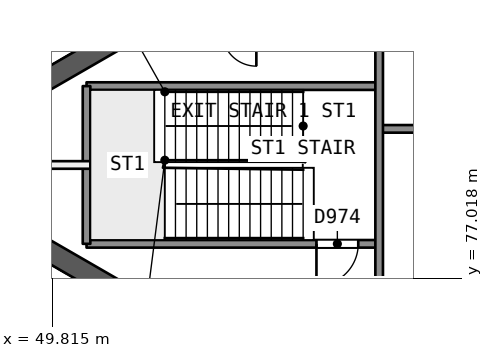
"""IFC4 building model, lengths in metres.
Left out: names, types, materials, properties, quantities, classifications, styles, units other than length and angle.
Written with IfcOpenShell. Run it as: python <this file> out.ifc"""

import sys

from ifc_helpers import new_model, si_unit, direction, frame, frame_2d, origin, place, context, subcontext, project, spatial, rectangle, extrude, element, fill, save


model = new_model("IFC4")
c1 = context("Model", 3, precision=1e-05, world=origin(), true_north=direction((0.0, 1.0)))
c2 = subcontext(c1, "Body", "Model", "MODEL_VIEW")
j1 = project(units=[si_unit("LENGTHUNIT", "METRE"), si_unit("PLANEANGLEUNIT", "RADIAN")], contexts=[c1])
p1 = place(None, origin())
s1 = spatial("IfcSite", under=j1, at=p1, CompositionType="ELEMENT")
p2 = place(p1, origin())
s2 = spatial("IfcBuilding", under=s1, at=p2, CompositionType="ELEMENT")
p3 = place(p2, frame((0.0, 0.0, 185.9)))
s3 = spatial("IfcBuildingStorey", under=s2, at=p3, CompositionType="ELEMENT", Elevation=185.9)
p4 = place(p3, frame((60.709, 88.614, 0.0), z_axis=(0.0, 0.0, 1.0), x_axis=(-0.866020164116, -0.500009075263, 0.0)))
e1 = element("IfcWall", 1, at=p4, inside=s3, PredefinedType="SHEAR", context=c2, shape_type="SweptSolid", body=[
    extrude(rectangle(XDim=14.058, YDim=0.55, at=frame_2d((7.029, 0.0))), origin(), (0.0, 0.0, 1.0), 3.7),
])
p5 = place(p3, frame((48.672, 78.336, 0.0), z_axis=(0.0, 0.0, 1.0), x_axis=(0.866023530946, -0.500003243837, 0.0)))
e2 = element("IfcWall", 2, at=p5, inside=s3, PredefinedType="SHEAR", context=c2, shape_type="SweptSolid", body=[
    extrude(rectangle(XDim=14.175, YDim=0.55, at=frame_2d((7.087, 0.0))), origin(), (0.0, 0.0, 1.0), 3.7),
])
p6 = place(p3, frame((42.971, 82.7, 0.0), z_axis=(0.0, 0.0, 1.0), x_axis=(0.866024890781, 0.500000888547, 0.0)))
e3 = element("IfcWall", 3, at=p6, inside=s3, PredefinedType="SOLIDWALL", context=c2, shape_type="SweptSolid", body=[
    extrude(rectangle(XDim=52.776, YDim=0.3, at=frame_2d((26.388, 0.0))), origin(), (0.0, 0.0, 1.0), 3.25),
])
p7 = place(p6, frame((20.511, 0.0, 0.0)))
e4 = element("IfcOpeningElement", 4, at=p7, cuts=e3, PredefinedType="OPENING", context=c2, shape_type="SweptSolid", body=[
    extrude(rectangle(XDim=2.4, YDim=2.4, at=frame_2d((1.2, 1.2))), frame((0.0, 0.161, 0.0), z_axis=(0.0, -1.0, 0.0), x_axis=(1.0, 0.0, 0.0)), (0.0, 0.0, 1.0), 0.321),
])
p8 = place(p6, frame((9.385, 0.0, 0.0)))
e5 = element("IfcOpeningElement", 5, at=p8, cuts=e3, PredefinedType="OPENING", context=c2, shape_type="SweptSolid", body=[
    extrude(rectangle(XDim=2.4, YDim=2.4, at=frame_2d((1.2, 1.2))), frame((0.0, 0.161, 0.0), z_axis=(0.0, -1.0, 0.0), x_axis=(1.0, 0.0, 0.0)), (0.0, 0.0, 1.0), 0.321),
])
p9 = place(p6, frame((39.984, 0.0, 0.0)))
e6 = element("IfcOpeningElement", 6, at=p9, cuts=e3, PredefinedType="OPENING", context=c2, shape_type="SweptSolid", body=[
    extrude(rectangle(XDim=2.4, YDim=2.4, at=frame_2d((1.2, 1.2))), frame((0.0, 0.161, 0.0), z_axis=(0.0, -1.0, 0.0), x_axis=(1.0, 0.0, 0.0)), (0.0, 0.0, 1.0), 0.321),
])
p10 = place(p6, frame((26.268, 0.0, 0.9)))
e7 = element("IfcOpeningElement", 7, at=p10, cuts=e3, PredefinedType="OPENING", context=c2, shape_type="SweptSolid", body=[
    extrude(rectangle(XDim=1.8, YDim=1.5, at=frame_2d((0.9, 0.75))), frame((0.0, 0.161, 0.0), z_axis=(0.0, -1.0, 0.0), x_axis=(1.0, 0.0, 0.0)), (0.0, 0.0, 1.0), 0.321),
])
p11 = place(p3, frame((88.677, 50.912, 0.0), z_axis=(0.0, 0.0, 1.0), x_axis=(-0.866024890781, 0.500000888547, 0.0)))
e8 = element("IfcWall", 8, at=p11, inside=s3, PredefinedType="SOLIDWALL", context=c2, shape_type="SweptSolid", body=[
    extrude(rectangle(XDim=52.776, YDim=0.3, at=frame_2d((26.388, 0.0))), origin(), (0.0, 0.0, 1.0), 3.25),
])
p12 = place(p11, frame((18.953, 0.0, 0.0)))
e9 = element("IfcOpeningElement", 9, at=p12, cuts=e8, PredefinedType="OPENING", context=c2, shape_type="SweptSolid", body=[
    extrude(rectangle(XDim=2.4, YDim=2.4, at=frame_2d((1.2, 1.2))), frame((0.0, 0.161, 0.0), z_axis=(0.0, -1.0, 0.0), x_axis=(1.0, 0.0, 0.0)), (0.0, 0.0, 1.0), 0.321),
])
p13 = place(p11, frame((9.385, 0.0, 0.0)))
e10 = element("IfcOpeningElement", 10, at=p13, cuts=e8, PredefinedType="OPENING", context=c2, shape_type="SweptSolid", body=[
    extrude(rectangle(XDim=2.4, YDim=2.4, at=frame_2d((1.2, 1.2))), frame((0.0, 0.161, 0.0), z_axis=(0.0, -1.0, 0.0), x_axis=(1.0, 0.0, 0.0)), (0.0, 0.0, 1.0), 0.321),
])
p14 = place(p11, frame((39.984, 0.0, 0.0)))
e11 = element("IfcOpeningElement", 11, at=p14, cuts=e8, PredefinedType="OPENING", context=c2, shape_type="SweptSolid", body=[
    extrude(rectangle(XDim=2.4, YDim=2.4, at=frame_2d((1.2, 1.2))), frame((0.0, 0.161, 0.0), z_axis=(0.0, -1.0, 0.0), x_axis=(1.0, 0.0, 0.0)), (0.0, 0.0, 1.0), 0.321),
])
p15 = place(p11, frame((26.657, 0.0, 0.9)))
e12 = element("IfcOpeningElement", 12, at=p15, cuts=e8, PredefinedType="OPENING", context=c2, shape_type="SweptSolid", body=[
    extrude(rectangle(XDim=1.8, YDim=1.5, at=frame_2d((0.9, 0.75))), frame((0.0, 0.161, 0.0), z_axis=(0.0, -1.0, 0.0), x_axis=(1.0, 0.0, 0.0)), (0.0, 0.0, 1.0), 0.321),
])
p16 = place(p11, frame((22.76, 0.0, 0.9)))
e13 = element("IfcOpeningElement", 13, at=p16, cuts=e8, PredefinedType="OPENING", context=c2, shape_type="SweptSolid", body=[
    extrude(rectangle(XDim=1.8, YDim=1.5, at=frame_2d((0.9, 0.75))), frame((0.0, 0.161, 0.0), z_axis=(0.0, -1.0, 0.0), x_axis=(1.0, 0.0, 0.0)), (0.0, 0.0, 1.0), 0.321),
])
p17 = place(p3, frame((58.42, 82.075, 0.0), z_axis=(0.0, 0.0, 1.0), x_axis=(-1.0, 0.0, 0.0)))
e14 = element("IfcWall", 14, at=p17, inside=s3, PredefinedType="SOLIDWALL", context=c2, shape_type="SweptSolid", body=[
    extrude(rectangle(XDim=7.7, YDim=0.2, at=frame_2d((3.85, 0.0))), origin(), (0.0, 0.0, 1.0), 3.25),
])
p18 = place(p3, frame((60.9, 80.95, 0.0), z_axis=(0.0, 0.0, 1.0), x_axis=(-1.0, 0.0, 0.0)))
e15 = element("IfcWall", 15, at=p18, inside=s3, PredefinedType="SOLIDWALL", context=c2, shape_type="SweptSolid", body=[
    extrude(rectangle(XDim=2.48, YDim=0.2, at=frame_2d((1.24, 0.0))), origin(), (0.0, 0.0, 1.0), 3.25),
])
p19 = place(p3, frame((50.82, 80.0, 0.0), z_axis=(0.0, 0.0, 1.0), x_axis=(-1.0, 0.0, 0.0)))
e16 = element("IfcWall", 16, at=p19, inside=s3, PredefinedType="PARTITIONING", context=c2, shape_type="SweptSolid", body=[
    extrude(rectangle(XDim=1.873, YDim=0.2, at=frame_2d((0.937, 0.0))), origin(), (0.0, 0.0, 1.0), 3.25),
])
p20 = place(p3, frame((58.42, 77.925, 0.0), z_axis=(0.0, 0.0, 1.0), x_axis=(-1.0, 0.0, 0.0)))
e17 = element("IfcWall", 17, at=p20, inside=s3, PredefinedType="SOLIDWALL", context=c2, shape_type="SweptSolid", body=[
    extrude(rectangle(XDim=7.7, YDim=0.2, at=frame_2d((3.85, 0.0))), origin(), (0.0, 0.0, 1.0), 3.25),
])
p21 = place(p20, frame((0.55, 0.0, 0.0)))
e18 = element("IfcOpeningElement", 18, at=p21, cuts=e17, PredefinedType="OPENING", context=c2, shape_type="SweptSolid", body=[
    extrude(rectangle(XDim=1.1, YDim=2.1, at=frame_2d((0.55, 1.05))), frame((0.0, 0.11, 0.0), z_axis=(0.0, -1.0, 0.0), x_axis=(1.0, 0.0, 0.0)), (0.0, 0.0, 1.0), 0.221),
])
p22 = place(p3, frame((58.42, 86.974, 0.0), z_axis=(0.0, 0.0, 1.0), x_axis=(0.0, -1.0, 0.0)))
e19 = element("IfcWall", 19, at=p22, inside=s3, PredefinedType="SOLIDWALL", context=c2, shape_type="SweptSolid", body=[
    extrude(rectangle(XDim=10.524, YDim=0.2, at=frame_2d((5.262, 0.0))), origin(), (0.0, 0.0, 1.0), 3.25),
])
p23 = place(p22, frame((0.312, 0.0, 0.0)))
e20 = element("IfcOpeningElement", 20, at=p23, cuts=e19, PredefinedType="OPENING", context=c2, shape_type="SweptSolid", body=[
    extrude(rectangle(XDim=0.9, YDim=2.1, at=frame_2d((0.45, 1.05))), frame((0.0, 0.11, 0.0), z_axis=(0.0, -1.0, 0.0), x_axis=(1.0, 0.0, 0.0)), (0.0, 0.0, 1.0), 0.221),
])
p24 = place(p3, frame((50.72, 82.075, 0.0), z_axis=(0.0, 0.0, 1.0), x_axis=(0.0, -1.0, 0.0)))
e21 = element("IfcWall", 21, at=p24, inside=s3, PredefinedType="SOLIDWALL", context=c2, shape_type="SweptSolid", body=[
    extrude(rectangle(XDim=4.15, YDim=0.2, at=frame_2d((2.075, 0.0))), origin(), (0.0, 0.0, 1.0), 3.25),
])
p25 = place(p21, origin())
e22 = element("IfcDoor", 22, at=p25, inside=s3, OperationType="SINGLE_SWING_RIGHT", PredefinedType="NOTDEFINED", context=c2, shape_type="SweptSolid", body=[
    extrude(rectangle(XDim=1.1, YDim=2.1, at=frame_2d((0.55, 1.05))), frame((0.0, 0.025, 0.0), z_axis=(0.0, -1.0, 0.0), x_axis=(1.0, 0.0, 0.0)), (0.0, 0.0, 1.0), 0.05),
])
fill(e18, e22)
save(model, sys.argv[1])
